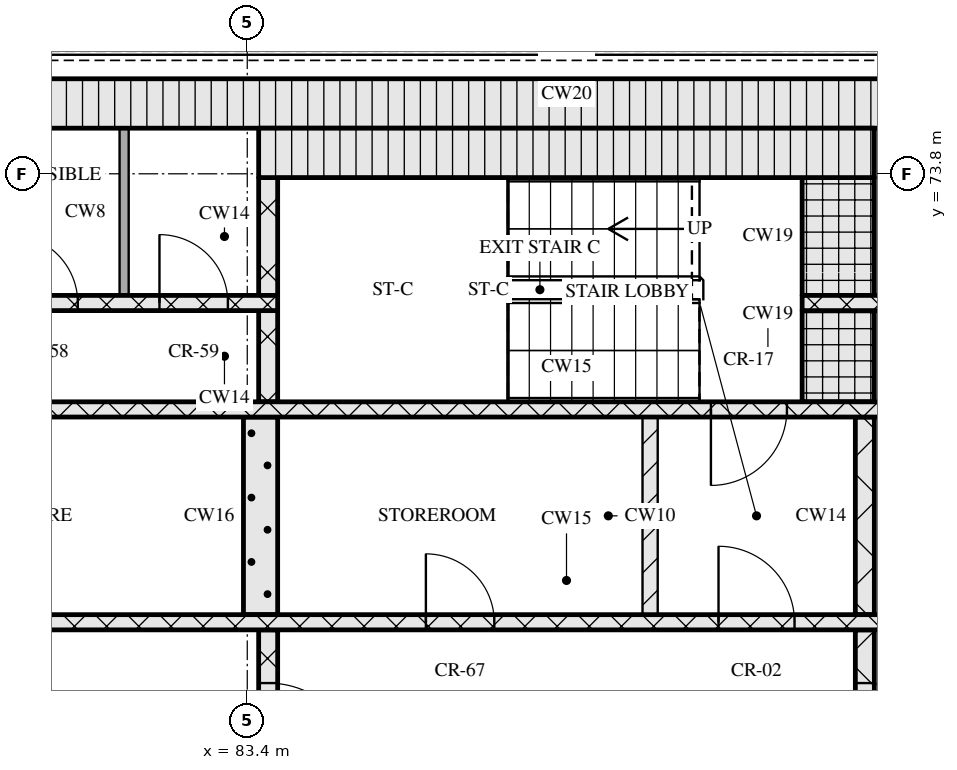
"""IFC4 building model, lengths in metres.
Left out: names, types, materials, properties, quantities, classifications, styles, units other than length and angle.
Written with IfcOpenShell. Run it as: python <this file> out.ifc"""

import sys

from ifc_helpers import new_model, si_unit, direction, frame, frame_2d, origin, place, context, subcontext, project, spatial, rectangle, extrude, element, fill, save


model = new_model("IFC4")
c1 = context("Model", 3, precision=1e-05, world=origin(), true_north=direction((0.0, 1.0)))
c2 = subcontext(c1, "Body", "Model", "MODEL_VIEW")
j1 = project(units=[si_unit("LENGTHUNIT", "METRE"), si_unit("PLANEANGLEUNIT", "RADIAN")], contexts=[c1])
p1 = place(None, origin())
s1 = spatial("IfcSite", under=j1, at=p1, CompositionType="ELEMENT")
p2 = place(p1, origin())
s2 = spatial("IfcBuilding", under=s1, at=p2, CompositionType="ELEMENT")
p3 = place(p2, frame((0.0, 0.0, 219.9)))
s3 = spatial("IfcBuildingStorey", under=s2, at=p3, CompositionType="ELEMENT", Elevation=219.9)
p4 = place(p3, frame((67.15, 74.725, 0.0), z_axis=(0.0, 0.0, 1.0), x_axis=(1.0, 0.0, 0.0)))
e1 = element("IfcWall", 1, at=p4, inside=s3, PredefinedType="SOLIDWALL", context=c2, shape_type="SweptSolid", body=[
    extrude(rectangle(XDim=40.9, YDim=0.65, at=frame_2d((20.45, 0.0))), origin(), (0.0, 0.0, 1.0), 3.32),
])
p5 = place(p3, frame((83.675, 65.2, 0.0), z_axis=(0.0, 0.0, 1.0), x_axis=(0.0, 1.0, 0.0)))
e2 = element("IfcWall", 2, at=p5, inside=s3, PredefinedType="SOLIDWALL", context=c2, shape_type="SweptSolid", body=[
    extrude(rectangle(XDim=2.6, YDim=0.25, at=frame_2d((1.3, 0.0))), origin(), (0.0, 0.0, 1.0), 3.32),
])
p6 = place(p5, frame((0.7, 0.0, 0.0)))
e3 = element("IfcOpeningElement", 3, at=p6, cuts=e2, PredefinedType="OPENING", context=c2, shape_type="SweptSolid", body=[
    extrude(rectangle(XDim=1.2, YDim=2.1, at=frame_2d((0.6, 1.05))), frame((0.0, 0.135, 0.0), z_axis=(0.0, -1.0, 0.0), x_axis=(1.0, 0.0, 0.0)), (0.0, 0.0, 1.0), 0.27),
])
p7 = place(p3, frame((91.525, 65.2, 0.0), z_axis=(0.0, 0.0, 1.0), x_axis=(0.0, 1.0, 0.0)))
e4 = element("IfcWall", 4, at=p7, inside=s3, PredefinedType="SOLIDWALL", context=c2, shape_type="SweptSolid", body=[
    extrude(rectangle(XDim=2.6, YDim=0.25, at=frame_2d((1.3, 0.0))), origin(), (0.0, 0.0, 1.0), 3.32),
])
p8 = place(p7, frame((0.7, 0.0, 0.0)))
e5 = element("IfcOpeningElement", 5, at=p8, cuts=e4, PredefinedType="OPENING", context=c2, shape_type="SweptSolid", body=[
    extrude(rectangle(XDim=1.2, YDim=2.1, at=frame_2d((0.6, 1.05))), frame((0.0, 0.135, 0.0), z_axis=(0.0, -1.0, 0.0), x_axis=(1.0, 0.0, 0.0)), (0.0, 0.0, 1.0), 0.27),
])
p9 = place(p3, frame((76.05, 67.9, 0.0), z_axis=(0.0, 0.0, 1.0), x_axis=(1.0, 0.0, 0.0)))
e6 = element("IfcWall", 6, at=p9, inside=s3, PredefinedType="SOLIDWALL", context=c2, shape_type="SweptSolid", body=[
    extrude(rectangle(XDim=23.1, YDim=0.2, at=frame_2d((11.55, 0.0))), origin(), (0.0, 0.0, 1.0), 3.32),
])
p10 = place(p9, frame((3.2, 0.0, 0.0)))
e7 = element("IfcOpeningElement", 7, at=p10, cuts=e6, PredefinedType="OPENING", context=c2, shape_type="SweptSolid", body=[
    extrude(rectangle(XDim=0.9, YDim=2.1, at=frame_2d((0.45, 1.05))), frame((0.0, 0.11, 0.0), z_axis=(0.0, -1.0, 0.0), x_axis=(1.0, 0.0, 0.0)), (0.0, 0.0, 1.0), 0.22),
])
p11 = place(p9, frame((9.7, 0.0, 0.0)))
e8 = element("IfcOpeningElement", 8, at=p11, cuts=e6, PredefinedType="OPENING", context=c2, shape_type="SweptSolid", body=[
    extrude(rectangle(XDim=0.9, YDim=2.1, at=frame_2d((0.45, 1.05))), frame((0.0, 0.11, 0.0), z_axis=(0.0, -1.0, 0.0), x_axis=(1.0, 0.0, 0.0)), (0.0, 0.0, 1.0), 0.22),
])
p12 = place(p9, frame((13.55, 0.0, 0.0)))
e9 = element("IfcOpeningElement", 9, at=p12, cuts=e6, PredefinedType="OPENING", context=c2, shape_type="SweptSolid", body=[
    extrude(rectangle(XDim=1.0, YDim=2.1, at=frame_2d((0.5, 1.05))), frame((0.0, 0.11, 0.0), z_axis=(0.0, -1.0, 0.0), x_axis=(1.0, 0.0, 0.0)), (0.0, 0.0, 1.0), 0.22),
])
p13 = place(p9, frame((16.2, 0.0, 0.0)))
e10 = element("IfcOpeningElement", 10, at=p13, cuts=e6, PredefinedType="OPENING", context=c2, shape_type="SweptSolid", body=[
    extrude(rectangle(XDim=1.1, YDim=2.1, at=frame_2d((0.55, 1.05))), frame((0.0, 0.11, 0.0), z_axis=(0.0, -1.0, 0.0), x_axis=(1.0, 0.0, 0.0)), (0.0, 0.0, 1.0), 0.22),
])
p14 = place(p9, frame((18.7, 0.0, 0.0)))
e11 = element("IfcOpeningElement", 11, at=p14, cuts=e6, PredefinedType="OPENING", context=c2, shape_type="SweptSolid", body=[
    extrude(rectangle(XDim=1.1, YDim=2.1, at=frame_2d((0.55, 1.05))), frame((0.0, 0.11, 0.0), z_axis=(0.0, -1.0, 0.0), x_axis=(1.0, 0.0, 0.0)), (0.0, 0.0, 1.0), 0.22),
])
p15 = place(p9, frame((21.2, 0.0, 0.0)))
e12 = element("IfcOpeningElement", 12, at=p15, cuts=e6, PredefinedType="OPENING", context=c2, shape_type="SweptSolid", body=[
    extrude(rectangle(XDim=1.1, YDim=2.1, at=frame_2d((0.55, 1.05))), frame((0.0, 0.11, 0.0), z_axis=(0.0, -1.0, 0.0), x_axis=(1.0, 0.0, 0.0)), (0.0, 0.0, 1.0), 0.22),
])
p16 = place(p3, frame((83.575, 68.0, 0.0), z_axis=(0.0, 0.0, 1.0), x_axis=(0.0, 1.0, 0.0)))
e13 = element("IfcWall", 13, at=p16, inside=s3, PredefinedType="SOLIDWALL", context=c2, shape_type="SweptSolid", body=[
    extrude(rectangle(XDim=2.6, YDim=0.45, at=frame_2d((1.3, 0.0))), origin(), (0.0, 0.0, 1.0), 3.32),
])
p17 = place(p3, frame((88.7, 68.0, 0.0), z_axis=(0.0, 0.0, 1.0), x_axis=(0.0, 1.0, 0.0)))
e14 = element("IfcWall", 14, at=p17, inside=s3, PredefinedType="PARTITIONING", context=c2, shape_type="SweptSolid", body=[
    extrude(rectangle(XDim=2.6, YDim=0.2, at=frame_2d((1.3, 0.0))), origin(), (0.0, 0.0, 1.0), 3.32),
])
p18 = place(p3, frame((91.525, 68.0, 0.0), z_axis=(0.0, 0.0, 1.0), x_axis=(0.0, 1.0, 0.0)))
e15 = element("IfcWall", 15, at=p18, inside=s3, PredefinedType="SOLIDWALL", context=c2, shape_type="SweptSolid", body=[
    extrude(rectangle(XDim=2.6, YDim=0.25, at=frame_2d((1.3, 0.0))), origin(), (0.0, 0.0, 1.0), 3.32),
])
p19 = place(p3, frame((67.8, 70.7, 0.0), z_axis=(0.0, 0.0, 1.0), x_axis=(1.0, 0.0, 0.0)))
e16 = element("IfcWall", 16, at=p19, inside=s3, PredefinedType="SOLIDWALL", context=c2, shape_type="SweptSolid", body=[
    extrude(rectangle(XDim=39.6, YDim=0.2, at=frame_2d((19.8, 0.0))), origin(), (0.0, 0.0, 1.0), 3.32),
])
p20 = place(p19, frame((0.65, 0.0, 0.0)))
e17 = element("IfcOpeningElement", 17, at=p20, cuts=e16, PredefinedType="OPENING", context=c2, shape_type="SweptSolid", body=[
    extrude(rectangle(XDim=1.1, YDim=2.1, at=frame_2d((0.55, 1.05))), frame((0.0, 0.11, 0.0), z_axis=(0.0, -1.0, 0.0), x_axis=(1.0, 0.0, 0.0)), (0.0, 0.0, 1.0), 0.22),
])
p21 = place(p19, frame((3.25, 0.0, 0.0)))
e18 = element("IfcOpeningElement", 18, at=p21, cuts=e16, PredefinedType="OPENING", context=c2, shape_type="SweptSolid", body=[
    extrude(rectangle(XDim=1.1, YDim=2.1, at=frame_2d((0.55, 1.05))), frame((0.0, 0.11, 0.0), z_axis=(0.0, -1.0, 0.0), x_axis=(1.0, 0.0, 0.0)), (0.0, 0.0, 1.0), 0.22),
])
p22 = place(p19, frame((5.9, 0.0, 0.0)))
e19 = element("IfcOpeningElement", 19, at=p22, cuts=e16, PredefinedType="OPENING", context=c2, shape_type="SweptSolid", body=[
    extrude(rectangle(XDim=1.0, YDim=2.1, at=frame_2d((0.5, 1.05))), frame((0.0, 0.11, 0.0), z_axis=(0.0, -1.0, 0.0), x_axis=(1.0, 0.0, 0.0)), (0.0, 0.0, 1.0), 0.22),
])
p23 = place(p19, frame((21.7, 0.0, 0.0)))
e20 = element("IfcOpeningElement", 20, at=p23, cuts=e16, PredefinedType="OPENING", context=c2, shape_type="SweptSolid", body=[
    extrude(rectangle(XDim=1.0, YDim=2.1, at=frame_2d((0.5, 1.05))), frame((0.0, 0.11, 0.0), z_axis=(0.0, -1.0, 0.0), x_axis=(1.0, 0.0, 0.0)), (0.0, 0.0, 1.0), 0.22),
])
p24 = place(p19, frame((32.7, 0.0, 0.0)))
e21 = element("IfcOpeningElement", 21, at=p24, cuts=e16, PredefinedType="OPENING", context=c2, shape_type="SweptSolid", body=[
    extrude(rectangle(XDim=1.0, YDim=2.1, at=frame_2d((0.5, 1.05))), frame((0.0, 0.11, 0.0), z_axis=(0.0, -1.0, 0.0), x_axis=(1.0, 0.0, 0.0)), (0.0, 0.0, 1.0), 0.22),
])
p25 = place(p19, frame((35.25, 0.0, 0.0)))
e22 = element("IfcOpeningElement", 22, at=p25, cuts=e16, PredefinedType="OPENING", context=c2, shape_type="SweptSolid", body=[
    extrude(rectangle(XDim=1.1, YDim=2.1, at=frame_2d((0.55, 1.05))), frame((0.0, 0.11, 0.0), z_axis=(0.0, -1.0, 0.0), x_axis=(1.0, 0.0, 0.0)), (0.0, 0.0, 1.0), 0.22),
])
p26 = place(p19, frame((37.85, 0.0, 0.0)))
e23 = element("IfcOpeningElement", 23, at=p26, cuts=e16, PredefinedType="OPENING", context=c2, shape_type="SweptSolid", body=[
    extrude(rectangle(XDim=1.1, YDim=2.1, at=frame_2d((0.55, 1.05))), frame((0.0, 0.11, 0.0), z_axis=(0.0, -1.0, 0.0), x_axis=(1.0, 0.0, 0.0)), (0.0, 0.0, 1.0), 0.22),
])
p27 = place(p3, frame((83.675, 70.8, 0.0), z_axis=(0.0, 0.0, 1.0), x_axis=(0.0, 1.0, 0.0)))
e24 = element("IfcWall", 24, at=p27, inside=s3, PredefinedType="SOLIDWALL", context=c2, shape_type="SweptSolid", body=[
    extrude(rectangle(XDim=1.2, YDim=0.25, at=frame_2d((0.6, 0.0))), origin(), (0.0, 0.0, 1.0), 3.32),
])
p28 = place(p3, frame((91.175, 70.8, 0.0), z_axis=(0.0, 0.0, 1.0), x_axis=(0.0, 1.0, 0.0)))
e25 = element("IfcWall", 25, at=p28, inside=s3, PredefinedType="SOLIDWALL", context=c2, shape_type="SweptSolid", body=[
    extrude(rectangle(XDim=1.2, YDim=0.95, at=frame_2d((0.6, 0.0))), origin(), (0.0, 0.0, 1.0), 3.32),
])
p29 = place(p3, frame((72.8, 72.1, 0.0), z_axis=(0.0, 0.0, 1.0), x_axis=(1.0, 0.0, 0.0)))
e26 = element("IfcWall", 26, at=p29, inside=s3, PredefinedType="SOLIDWALL", context=c2, shape_type="SweptSolid", body=[
    extrude(rectangle(XDim=11.0, YDim=0.2, at=frame_2d((5.5, 0.0))), origin(), (0.0, 0.0, 1.0), 3.32),
])
p30 = place(p29, frame((1.25, 0.0, 0.0)))
e27 = element("IfcOpeningElement", 27, at=p30, cuts=e26, PredefinedType="OPENING", context=c2, shape_type="SweptSolid", body=[
    extrude(rectangle(XDim=0.9, YDim=2.1, at=frame_2d((0.45, 1.05))), frame((0.0, 0.11, 0.0), z_axis=(0.0, -1.0, 0.0), x_axis=(1.0, 0.0, 0.0)), (0.0, 0.0, 1.0), 0.22),
])
p31 = place(p29, frame((4.65, 0.0, 0.0)))
e28 = element("IfcOpeningElement", 28, at=p31, cuts=e26, PredefinedType="OPENING", context=c2, shape_type="SweptSolid", body=[
    extrude(rectangle(XDim=0.9, YDim=2.1, at=frame_2d((0.45, 1.05))), frame((0.0, 0.11, 0.0), z_axis=(0.0, -1.0, 0.0), x_axis=(1.0, 0.0, 0.0)), (0.0, 0.0, 1.0), 0.22),
])
p32 = place(p29, frame((7.47, 0.0, 0.0)))
e29 = element("IfcOpeningElement", 29, at=p32, cuts=e26, PredefinedType="OPENING", context=c2, shape_type="SweptSolid", body=[
    extrude(rectangle(XDim=0.9, YDim=2.1, at=frame_2d((0.45, 1.05))), frame((0.0, 0.11, 0.0), z_axis=(0.0, -1.0, 0.0), x_axis=(1.0, 0.0, 0.0)), (0.0, 0.0, 1.0), 0.22),
])
p33 = place(p29, frame((9.445, 0.0, 0.0)))
e30 = element("IfcOpeningElement", 30, at=p33, cuts=e26, PredefinedType="OPENING", context=c2, shape_type="SweptSolid", body=[
    extrude(rectangle(XDim=0.9, YDim=2.1, at=frame_2d((0.45, 1.05))), frame((0.0, 0.11, 0.0), z_axis=(0.0, -1.0, 0.0), x_axis=(1.0, 0.0, 0.0)), (0.0, 0.0, 1.0), 0.22),
])
p34 = place(p3, frame((90.7, 72.1, 0.0), z_axis=(0.0, 0.0, 1.0), x_axis=(1.0, 0.0, 0.0)))
e31 = element("IfcWall", 31, at=p34, inside=s3, PredefinedType="SOLIDWALL", context=c2, shape_type="SweptSolid", body=[
    extrude(rectangle(XDim=11.7, YDim=0.2, at=frame_2d((5.85, 0.0))), origin(), (0.0, 0.0, 1.0), 3.32),
])
p35 = place(p34, frame((1.6, 0.0, 0.0)))
e32 = element("IfcOpeningElement", 32, at=p35, cuts=e31, PredefinedType="OPENING", context=c2, shape_type="SweptSolid", body=[
    extrude(rectangle(XDim=0.9, YDim=2.1, at=frame_2d((0.45, 1.05))), frame((0.0, 0.11, 0.0), z_axis=(0.0, -1.0, 0.0), x_axis=(1.0, 0.0, 0.0)), (0.0, 0.0, 1.0), 0.22),
])
p36 = place(p34, frame((5.335, 0.0, 0.0)))
e33 = element("IfcOpeningElement", 33, at=p36, cuts=e31, PredefinedType="OPENING", context=c2, shape_type="SweptSolid", body=[
    extrude(rectangle(XDim=0.9, YDim=2.1, at=frame_2d((0.45, 1.05))), frame((0.0, 0.11, 0.0), z_axis=(0.0, -1.0, 0.0), x_axis=(1.0, 0.0, 0.0)), (0.0, 0.0, 1.0), 0.22),
])
p37 = place(p34, frame((9.55, 0.0, 0.0)))
e34 = element("IfcOpeningElement", 34, at=p37, cuts=e31, PredefinedType="OPENING", context=c2, shape_type="SweptSolid", body=[
    extrude(rectangle(XDim=0.9, YDim=2.1, at=frame_2d((0.45, 1.05))), frame((0.0, 0.11, 0.0), z_axis=(0.0, -1.0, 0.0), x_axis=(1.0, 0.0, 0.0)), (0.0, 0.0, 1.0), 0.22),
])
p38 = place(p3, frame((81.78, 72.2, 0.0), z_axis=(0.0, 0.0, 1.0), x_axis=(0.0, 1.0, 0.0)))
e35 = element("IfcWall", 35, at=p38, inside=s3, PredefinedType="PARTITIONING", context=c2, shape_type="SweptSolid", body=[
    extrude(rectangle(XDim=2.2, YDim=0.12, at=frame_2d((1.1, 0.0))), origin(), (0.0, 0.0, 1.0), 3.32),
])
p39 = place(p3, frame((83.675, 72.2, 0.0), z_axis=(0.0, 0.0, 1.0), x_axis=(0.0, 1.0, 0.0)))
e36 = element("IfcWall", 36, at=p39, inside=s3, PredefinedType="SOLIDWALL", context=c2, shape_type="SweptSolid", body=[
    extrude(rectangle(XDim=1.55, YDim=0.25, at=frame_2d((0.775, 0.0))), origin(), (0.0, 0.0, 1.0), 3.32),
])
p40 = place(p3, frame((91.175, 72.2, 0.0), z_axis=(0.0, 0.0, 1.0), x_axis=(0.0, 1.0, 0.0)))
e37 = element("IfcWall", 37, at=p40, inside=s3, PredefinedType="SOLIDWALL", context=c2, shape_type="SweptSolid", body=[
    extrude(rectangle(XDim=1.55, YDim=0.95, at=frame_2d((0.775, 0.0))), origin(), (0.0, 0.0, 1.0), 3.32),
])
p41 = place(p3, frame((83.55, 74.075, 0.0), z_axis=(0.0, 0.0, 1.0), x_axis=(1.0, 0.0, 0.0)))
e38 = element("IfcWall", 38, at=p41, inside=s3, PredefinedType="SOLIDWALL", context=c2, shape_type="SweptSolid", body=[
    extrude(rectangle(XDim=8.1, YDim=0.65, at=frame_2d((4.05, 0.0))), origin(), (0.0, 0.0, 1.0), 3.32),
])
p42 = place(p6, origin())
e39 = element("IfcDoor", 39, at=p42, inside=s3, OperationType="SINGLE_SWING_RIGHT", PredefinedType="DOOR", context=c2, shape_type="SweptSolid", body=[
    extrude(rectangle(XDim=1.2, YDim=2.1, at=frame_2d((0.6, 1.05))), frame((0.0, 0.025, 0.0), z_axis=(0.0, -1.0, 0.0), x_axis=(1.0, 0.0, 0.0)), (0.0, 0.0, 1.0), 0.05),
])
fill(e3, e39)
p43 = place(p8, origin())
e40 = element("IfcDoor", 40, at=p43, inside=s3, OperationType="SINGLE_SWING_RIGHT", PredefinedType="DOOR", context=c2, shape_type="SweptSolid", body=[
    extrude(rectangle(XDim=1.2, YDim=2.1, at=frame_2d((0.6, 1.05))), frame((0.0, 0.025, 0.0), z_axis=(0.0, -1.0, 0.0), x_axis=(1.0, 0.0, 0.0)), (0.0, 0.0, 1.0), 0.05),
])
fill(e5, e40)
p44 = place(p11, origin())
e41 = element("IfcDoor", 41, at=p44, inside=s3, OperationType="SINGLE_SWING_LEFT", PredefinedType="DOOR", context=c2, shape_type="SweptSolid", body=[
    extrude(rectangle(XDim=0.9, YDim=2.1, at=frame_2d((0.45, 1.05))), frame((0.0, 0.025, 0.0), z_axis=(0.0, -1.0, 0.0), x_axis=(1.0, 0.0, 0.0)), (0.0, 0.0, 1.0), 0.05),
])
fill(e8, e41)
p45 = place(p12, origin())
e42 = element("IfcDoor", 42, at=p45, inside=s3, OperationType="SINGLE_SWING_LEFT", PredefinedType="DOOR", context=c2, shape_type="SweptSolid", body=[
    extrude(rectangle(XDim=1.0, YDim=2.1, at=frame_2d((0.5, 1.05))), frame((0.0, 0.025, 0.0), z_axis=(0.0, -1.0, 0.0), x_axis=(1.0, 0.0, 0.0)), (0.0, 0.0, 1.0), 0.05),
])
fill(e9, e42)
p46 = place(p23, origin())
e43 = element("IfcDoor", 43, at=p46, inside=s3, OperationType="SINGLE_SWING_RIGHT", PredefinedType="DOOR", context=c2, shape_type="SweptSolid", body=[
    extrude(rectangle(XDim=1.0, YDim=2.1, at=frame_2d((0.5, 1.05))), frame((0.0, 0.025, 0.0), z_axis=(0.0, -1.0, 0.0), x_axis=(1.0, 0.0, 0.0)), (0.0, 0.0, 1.0), 0.05),
])
fill(e20, e43)
p47 = place(p32, origin())
e44 = element("IfcDoor", 44, at=p47, inside=s3, OperationType="SINGLE_SWING_LEFT", PredefinedType="DOOR", context=c2, shape_type="SweptSolid", body=[
    extrude(rectangle(XDim=0.9, YDim=2.1, at=frame_2d((0.45, 1.05))), frame((0.0, 0.025, 0.0), z_axis=(0.0, -1.0, 0.0), x_axis=(1.0, 0.0, 0.0)), (0.0, 0.0, 1.0), 0.05),
])
fill(e29, e44)
p48 = place(p33, origin())
e45 = element("IfcDoor", 45, at=p48, inside=s3, OperationType="SINGLE_SWING_LEFT", PredefinedType="DOOR", context=c2, shape_type="SweptSolid", body=[
    extrude(rectangle(XDim=0.9, YDim=2.1, at=frame_2d((0.45, 1.05))), frame((0.0, 0.025, 0.0), z_axis=(0.0, -1.0, 0.0), x_axis=(1.0, 0.0, 0.0)), (0.0, 0.0, 1.0), 0.05),
])
fill(e30, e45)
save(model, sys.argv[1])
